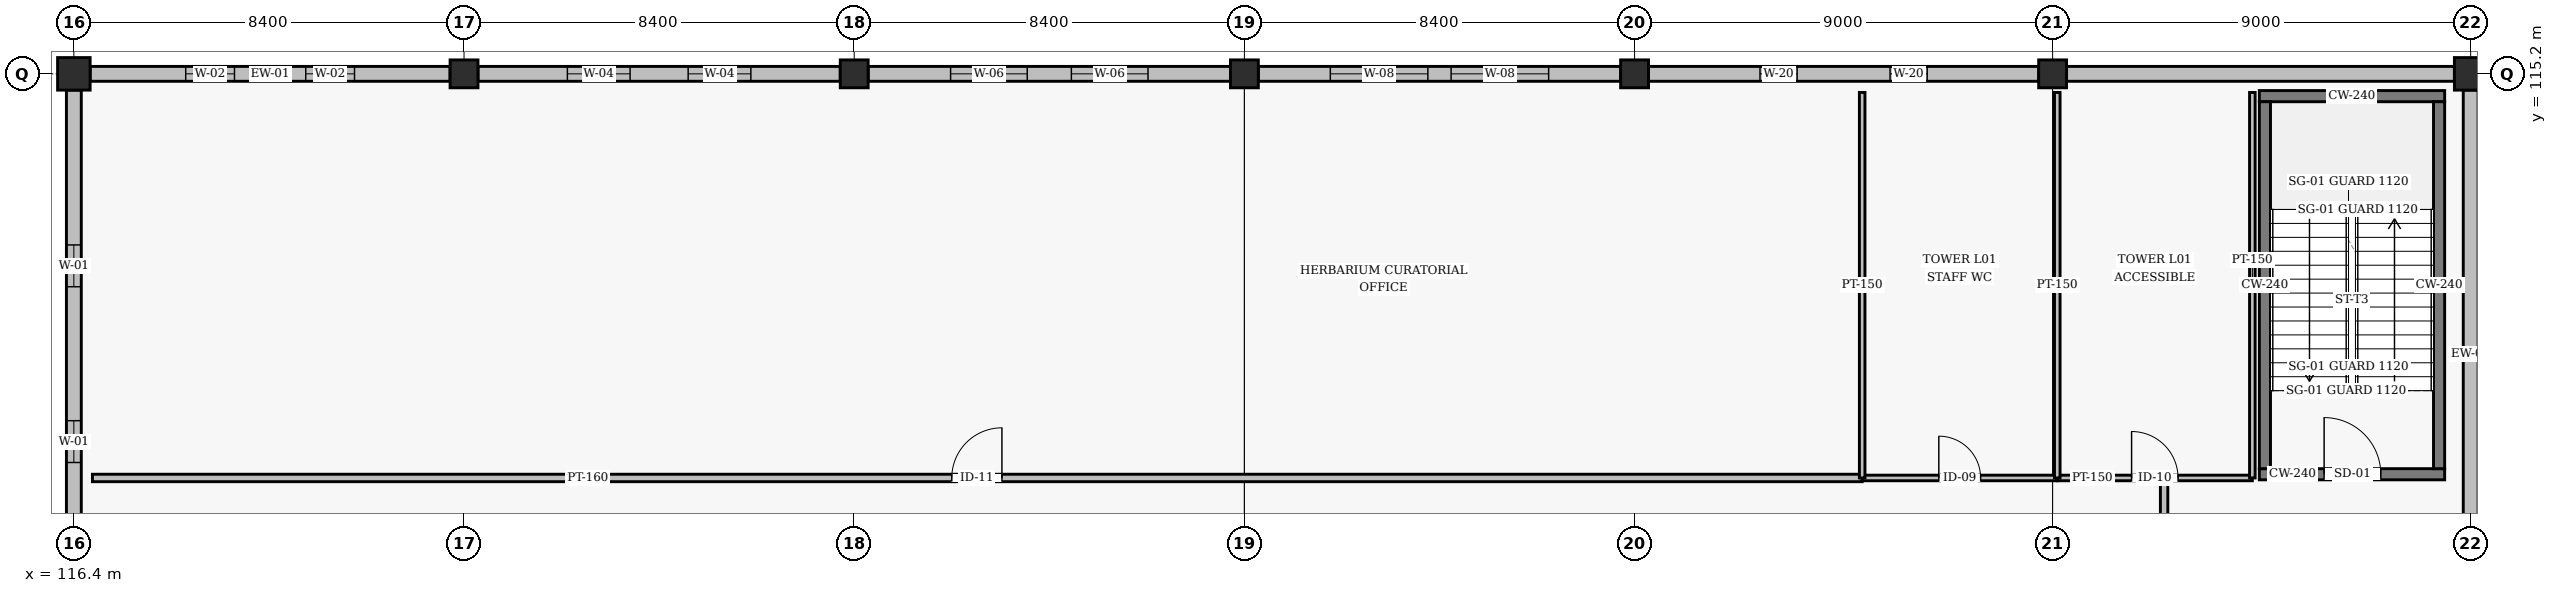
"""IFC4 building model, lengths in metres.
Left out: names, types, materials, properties, quantities, classifications, styles, units other than length and angle.
Written with IfcOpenShell. Run it as: python <this file> out.ifc"""

import sys

from ifc_helpers import new_model, si_unit, direction, frame, frame_2d, origin, origin_2d, place, context, subcontext, project, spatial, rectangle, hollow_rectangle, extrude, element, fill, save


model = new_model("IFC4")
c1 = context("Model", 3, precision=1e-05, world=origin(), true_north=direction((0.0, 1.0)))
c2 = subcontext(c1, "Body", "Model", "MODEL_VIEW")
j1 = project(units=[si_unit("LENGTHUNIT", "METRE"), si_unit("PLANEANGLEUNIT", "RADIAN")], contexts=[c1])
p1 = place(None, origin())
s1 = spatial("IfcSite", under=j1, at=p1, CompositionType="ELEMENT")
p2 = place(p1, origin())
s2 = spatial("IfcBuilding", under=s1, at=p2, CompositionType="ELEMENT")
p3 = place(p2, frame((0.0, 0.0, 4.8)))
s3 = spatial("IfcBuildingStorey", under=s2, at=p3, CompositionType="ELEMENT", Elevation=4.8)
p4 = place(p3, frame((116.4, 115.2, 0.0), z_axis=(0.0, 0.0, 1.0), x_axis=(1.0, 0.0, 0.0)))
e1 = element("IfcColumn", 1, at=p4, inside=s3, PredefinedType="COLUMN", context=c2, shape_type="SweptSolid", body=[
    extrude(hollow_rectangle(XDim=0.7, YDim=0.7, WallThickness=0.032, InnerFilletRadius=0.032, OuterFilletRadius=0.064, at=origin_2d()), origin(), (0.0, 0.0, 1.0), 4.2),
])
for number, where, z_axis, x_axis in (
    (2, (124.8, 115.2, 0.0), (0.0, 0.0, 1.0), (1.0, 0.0, 0.0)),
    (3, (133.2, 115.2, 0.0), (0.0, 0.0, 1.0), (1.0, 0.0, 0.0)),
    (4, (141.6, 115.2, 0.0), (0.0, 0.0, 1.0), (1.0, 0.0, 0.0)),
    (5, (150.0, 115.2, 0.0), (0.0, 0.0, 1.0), (1.0, 0.0, 0.0)),
    (6, (159.0, 115.2, 0.0), (0.0, 0.0, 1.0), (1.0, 0.0, 0.0)),
):
    element("IfcColumn", number, at=place(p3, frame(where, z_axis=z_axis, x_axis=x_axis)), inside=s3, PredefinedType="COLUMN", context=c2, shape_type="SweptSolid", body=[
        extrude(hollow_rectangle(XDim=0.6, YDim=0.6, WallThickness=0.025, InnerFilletRadius=0.025, OuterFilletRadius=0.05, at=origin_2d()), origin(), (0.0, 0.0, 1.0), 4.2),
    ])
p5 = place(p3, frame((168.0, 115.2, 0.0), z_axis=(0.0, 0.0, 1.0), x_axis=(1.0, 0.0, 0.0)))
e7 = element("IfcColumn", 7, at=p5, inside=s3, PredefinedType="COLUMN", context=c2, shape_type="SweptSolid", body=[
    extrude(hollow_rectangle(XDim=0.7, YDim=0.7, WallThickness=0.032, InnerFilletRadius=0.032, OuterFilletRadius=0.064, at=origin_2d()), origin(), (0.0, 0.0, 1.0), 4.2),
])
p6 = place(p3, frame((168.0, 103.5, 0.0), z_axis=(0.0, 0.0, 1.0), x_axis=(0.0, 1.0, 0.0)))
e8 = element("IfcWall", 8, at=p6, inside=s3, PredefinedType="SOLIDWALL", context=c2, shape_type="SweptSolid", body=[
    extrude(rectangle(XDim=11.35, YDim=0.32, at=frame_2d((5.675, 0.0))), origin(), (0.0, 0.0, 1.0), 3.163),
])
p7 = place(p3, frame((167.65, 115.2, 0.0), z_axis=(0.0, 0.0, 1.0), x_axis=(-1.0, 0.0, 0.0)))
e9 = element("IfcWall", 9, at=p7, inside=s3, PredefinedType="SOLIDWALL", context=c2, shape_type="SweptSolid", body=[
    extrude(rectangle(XDim=8.35, YDim=0.32, at=frame_2d((4.175, 0.0))), origin(), (0.0, 0.0, 1.0), 3.163),
])
p8 = place(p3, frame((158.7, 115.2, 0.0), z_axis=(0.0, 0.0, 1.0), x_axis=(-1.0, 0.0, 0.0)))
e10 = element("IfcWall", 10, at=p8, inside=s3, PredefinedType="SOLIDWALL", context=c2, shape_type="SweptSolid", body=[
    extrude(rectangle(XDim=8.4, YDim=0.32, at=frame_2d((4.2, 0.0))), origin(), (0.0, 0.0, 1.0), 3.163),
])
p9 = place(p8, frame((2.4, 0.0, 1.25)))
e11 = element("IfcOpeningElement", 11, at=p9, cuts=e10, PredefinedType="OPENING", context=c2, shape_type="SweptSolid", body=[
    extrude(rectangle(XDim=0.8, YDim=1.35, at=frame_2d((0.4, 0.675))), frame((0.0, 0.17, 0.0), z_axis=(0.0, -1.0, 0.0), x_axis=(1.0, 0.0, 0.0)), (0.0, 0.0, 1.0), 0.34),
])
p10 = place(p8, frame((5.2, 0.0, 1.25)))
e12 = element("IfcOpeningElement", 12, at=p10, cuts=e10, PredefinedType="OPENING", context=c2, shape_type="SweptSolid", body=[
    extrude(rectangle(XDim=0.8, YDim=1.35, at=frame_2d((0.4, 0.675))), frame((0.0, 0.17, 0.0), z_axis=(0.0, -1.0, 0.0), x_axis=(1.0, 0.0, 0.0)), (0.0, 0.0, 1.0), 0.34),
])
p11 = place(p3, frame((149.7, 115.2, 0.0), z_axis=(0.0, 0.0, 1.0), x_axis=(-1.0, 0.0, 0.0)))
e13 = element("IfcWall", 13, at=p11, inside=s3, PredefinedType="SOLIDWALL", context=c2, shape_type="SweptSolid", body=[
    extrude(rectangle(XDim=7.8, YDim=0.32, at=frame_2d((3.9, 0.0))), origin(), (0.0, 0.0, 1.0), 3.263),
])
p12 = place(p11, frame((1.55, 0.0, 0.85)))
e14 = element("IfcOpeningElement", 14, at=p12, cuts=e13, PredefinedType="OPENING", context=c2, shape_type="SweptSolid", body=[
    extrude(rectangle(XDim=2.1, YDim=2.1, at=frame_2d((1.05, 1.05))), frame((0.0, 0.17, 0.0), z_axis=(0.0, -1.0, 0.0), x_axis=(1.0, 0.0, 0.0)), (0.0, 0.0, 1.0), 0.34),
])
p13 = place(p11, frame((4.15, 0.0, 0.85)))
e15 = element("IfcOpeningElement", 15, at=p13, cuts=e13, PredefinedType="OPENING", context=c2, shape_type="SweptSolid", body=[
    extrude(rectangle(XDim=2.1, YDim=2.1, at=frame_2d((1.05, 1.05))), frame((0.0, 0.17, 0.0), z_axis=(0.0, -1.0, 0.0), x_axis=(1.0, 0.0, 0.0)), (0.0, 0.0, 1.0), 0.34),
])
p14 = place(p3, frame((141.3, 115.2, 0.0), z_axis=(0.0, 0.0, 1.0), x_axis=(-1.0, 0.0, 0.0)))
e16 = element("IfcWall", 16, at=p14, inside=s3, PredefinedType="SOLIDWALL", context=c2, shape_type="SweptSolid", body=[
    extrude(rectangle(XDim=7.8, YDim=0.32, at=frame_2d((3.9, 0.0))), origin(), (0.0, 0.0, 1.0), 3.263),
])
p15 = place(p14, frame((1.775, 0.0, 0.85)))
e17 = element("IfcOpeningElement", 17, at=p15, cuts=e16, PredefinedType="OPENING", context=c2, shape_type="SweptSolid", body=[
    extrude(rectangle(XDim=1.65, YDim=2.1, at=frame_2d((0.825, 1.05))), frame((0.0, 0.17, 0.0), z_axis=(0.0, -1.0, 0.0), x_axis=(1.0, 0.0, 0.0)), (0.0, 0.0, 1.0), 0.34),
])
p16 = place(p14, frame((4.375, 0.0, 0.85)))
e18 = element("IfcOpeningElement", 18, at=p16, cuts=e16, PredefinedType="OPENING", context=c2, shape_type="SweptSolid", body=[
    extrude(rectangle(XDim=1.65, YDim=2.1, at=frame_2d((0.825, 1.05))), frame((0.0, 0.17, 0.0), z_axis=(0.0, -1.0, 0.0), x_axis=(1.0, 0.0, 0.0)), (0.0, 0.0, 1.0), 0.34),
])
p17 = place(p3, frame((132.9, 115.2, 0.0), z_axis=(0.0, 0.0, 1.0), x_axis=(-1.0, 0.0, 0.0)))
e19 = element("IfcWall", 19, at=p17, inside=s3, PredefinedType="SOLIDWALL", context=c2, shape_type="SweptSolid", body=[
    extrude(rectangle(XDim=7.8, YDim=0.32, at=frame_2d((3.9, 0.0))), origin(), (0.0, 0.0, 1.0), 3.263),
])
p18 = place(p17, frame((1.925, 0.0, 0.85)))
e20 = element("IfcOpeningElement", 20, at=p18, cuts=e19, PredefinedType="OPENING", context=c2, shape_type="SweptSolid", body=[
    extrude(rectangle(XDim=1.35, YDim=2.1, at=frame_2d((0.675, 1.05))), frame((0.0, 0.17, 0.0), z_axis=(0.0, -1.0, 0.0), x_axis=(1.0, 0.0, 0.0)), (0.0, 0.0, 1.0), 0.34),
])
p19 = place(p17, frame((4.525, 0.0, 0.85)))
e21 = element("IfcOpeningElement", 21, at=p19, cuts=e19, PredefinedType="OPENING", context=c2, shape_type="SweptSolid", body=[
    extrude(rectangle(XDim=1.35, YDim=2.1, at=frame_2d((0.675, 1.05))), frame((0.0, 0.17, 0.0), z_axis=(0.0, -1.0, 0.0), x_axis=(1.0, 0.0, 0.0)), (0.0, 0.0, 1.0), 0.34),
])
p20 = place(p3, frame((124.5, 115.2, 0.0), z_axis=(0.0, 0.0, 1.0), x_axis=(-1.0, 0.0, 0.0)))
e22 = element("IfcWall", 22, at=p20, inside=s3, PredefinedType="SOLIDWALL", context=c2, shape_type="SweptSolid", body=[
    extrude(rectangle(XDim=7.75, YDim=0.32, at=frame_2d((3.875, 0.0))), origin(), (0.0, 0.0, 1.0), 3.263),
])
p21 = place(p20, frame((2.058, 0.0, 0.9)))
e23 = element("IfcOpeningElement", 23, at=p21, cuts=e22, PredefinedType="OPENING", context=c2, shape_type="SweptSolid", body=[
    extrude(rectangle(XDim=1.05, YDim=1.95, at=frame_2d((0.525, 0.975))), frame((0.0, 0.17, 0.0), z_axis=(0.0, -1.0, 0.0), x_axis=(1.0, 0.0, 0.0)), (0.0, 0.0, 1.0), 0.34),
])
p22 = place(p20, frame((4.642, 0.0, 0.9)))
e24 = element("IfcOpeningElement", 24, at=p22, cuts=e22, PredefinedType="OPENING", context=c2, shape_type="SweptSolid", body=[
    extrude(rectangle(XDim=1.05, YDim=1.95, at=frame_2d((0.525, 0.975))), frame((0.0, 0.17, 0.0), z_axis=(0.0, -1.0, 0.0), x_axis=(1.0, 0.0, 0.0)), (0.0, 0.0, 1.0), 0.34),
])
p23 = place(p3, frame((116.4, 114.85, 0.0), z_axis=(0.0, 0.0, 1.0), x_axis=(0.0, -1.0, 0.0)))
e25 = element("IfcWall", 25, at=p23, inside=s3, PredefinedType="SOLIDWALL", context=c2, shape_type="SweptSolid", body=[
    extrude(rectangle(XDim=11.35, YDim=0.32, at=frame_2d((5.675, 0.0))), origin(), (0.0, 0.0, 1.0), 3.163),
])
p24 = place(p23, frame((3.333, 0.0, 0.95)))
e26 = element("IfcOpeningElement", 26, at=p24, cuts=e25, PredefinedType="OPENING", context=c2, shape_type="SweptSolid", body=[
    extrude(rectangle(XDim=0.9, YDim=1.8, at=frame_2d((0.45, 0.9))), frame((0.0, 0.17, 0.0), z_axis=(0.0, -1.0, 0.0), x_axis=(1.0, 0.0, 0.0)), (0.0, 0.0, 1.0), 0.34),
])
p25 = place(p23, frame((7.117, 0.0, 0.95)))
e27 = element("IfcOpeningElement", 27, at=p25, cuts=e25, PredefinedType="OPENING", context=c2, shape_type="SweptSolid", body=[
    extrude(rectangle(XDim=0.9, YDim=1.8, at=frame_2d((0.45, 0.9))), frame((0.0, 0.17, 0.0), z_axis=(0.0, -1.0, 0.0), x_axis=(1.0, 0.0, 0.0)), (0.0, 0.0, 1.0), 0.34),
])
p26 = place(p3, frame((163.45, 106.58, 0.0), z_axis=(0.0, 0.0, 1.0), x_axis=(1.0, 0.0, 0.0)))
e28 = element("IfcWall", 28, at=p26, inside=s3, PredefinedType="SHEAR", context=c2, shape_type="SweptSolid", body=[
    extrude(rectangle(XDim=3.99, YDim=0.24, at=frame_2d((1.995, 0.0))), origin(), (0.0, 0.0, 1.0), 3.955),
])
p27 = place(p26, frame((1.395, 0.0, 0.0)))
e29 = element("IfcOpeningElement", 29, at=p27, cuts=e28, PredefinedType="OPENING", context=c2, shape_type="SweptSolid", body=[
    extrude(rectangle(XDim=1.22, YDim=2.18, at=frame_2d((0.61, 1.09))), frame((0.0, 0.13, 0.0), z_axis=(0.0, -1.0, 0.0), x_axis=(1.0, 0.0, 0.0)), (0.0, 0.0, 1.0), 0.26),
])
p28 = place(p3, frame((163.45, 114.72, 0.0), z_axis=(0.0, 0.0, 1.0), x_axis=(1.0, 0.0, 0.0)))
e30 = element("IfcWall", 30, at=p28, inside=s3, PredefinedType="SHEAR", context=c2, shape_type="SweptSolid", body=[
    extrude(rectangle(XDim=3.99, YDim=0.24, at=frame_2d((1.995, 0.0))), origin(), (0.0, 0.0, 1.0), 3.955),
])
for number, where, z_axis, x_axis in (
    (31, (163.57, 106.7, 0.0), (0.0, 0.0, 1.0), (0.0, 1.0, 0.0)),
    (32, (167.32, 106.7, 0.0), (0.0, 0.0, 1.0), (0.0, 1.0, 0.0)),
):
    element("IfcWall", number, at=place(p3, frame(where, z_axis=z_axis, x_axis=x_axis)), inside=s3, PredefinedType="SHEAR", context=c2, shape_type="SweptSolid", body=[
        extrude(rectangle(XDim=7.9, YDim=0.24, at=frame_2d((3.95, 0.0))), origin(), (0.0, 0.0, 1.0), 3.955),
    ])
p29 = place(p3, frame((161.4, 91.3, 0.0), z_axis=(0.0, 0.0, 1.0), x_axis=(0.0, 1.0, 0.0)))
e33 = element("IfcWall", 33, at=p29, inside=s3, PredefinedType="PARTITIONING", context=c2, shape_type="SweptSolid", body=[
    extrude(rectangle(XDim=15.1, YDim=0.16, at=frame_2d((7.55, 0.0))), origin(), (0.0, 0.0, 1.0), 3.305),
])
p30 = place(p29, frame((7.0, 0.0, 0.0)))
e34 = element("IfcOpeningElement", 34, at=p30, cuts=e33, PredefinedType="OPENING", context=c2, shape_type="SweptSolid", body=[
    extrude(rectangle(XDim=1.08, YDim=2.08, at=frame_2d((0.54, 1.04))), frame((0.0, 0.09, 0.0), z_axis=(0.0, -1.0, 0.0), x_axis=(1.0, 0.0, 0.0)), (0.0, 0.0, 1.0), 0.18),
])
p31 = place(p3, frame((116.8, 106.5, 0.0), z_axis=(0.0, 0.0, 1.0), x_axis=(1.0, 0.0, 0.0)))
e35 = element("IfcWall", 35, at=p31, inside=s3, PredefinedType="PARTITIONING", context=c2, shape_type="SweptSolid", body=[
    extrude(rectangle(XDim=38.1, YDim=0.16, at=frame_2d((19.05, 0.0))), origin(), (0.0, 0.0, 1.0), 3.255),
])
p32 = place(p31, frame((18.5, 0.0, 0.0)))
e36 = element("IfcOpeningElement", 36, at=p32, cuts=e35, PredefinedType="OPENING", context=c2, shape_type="SweptSolid", body=[
    extrude(rectangle(XDim=1.08, YDim=2.08, at=frame_2d((0.54, 1.04))), frame((0.0, 0.09, 0.0), z_axis=(0.0, -1.0, 0.0), x_axis=(1.0, 0.0, 0.0)), (0.0, 0.0, 1.0), 0.18),
])
p33 = place(p3, frame((154.9, 106.5, 0.0), z_axis=(0.0, 0.0, 1.0), x_axis=(1.0, 0.0, 0.0)))
e37 = element("IfcWall", 37, at=p33, inside=s3, PredefinedType="PARTITIONING", context=c2, shape_type="SweptSolid", body=[
    extrude(rectangle(XDim=4.2, YDim=0.12, at=frame_2d((2.1, 0.0))), origin(), (0.0, 0.0, 1.0), 3.255),
])
p34 = place(p33, frame((1.65, 0.0, 0.0)))
e38 = element("IfcOpeningElement", 38, at=p34, cuts=e37, PredefinedType="OPENING", context=c2, shape_type="SweptSolid", body=[
    extrude(rectangle(XDim=0.9, YDim=2.1, at=frame_2d((0.45, 1.05))), frame((0.0, 0.07, 0.0), z_axis=(0.0, -1.0, 0.0), x_axis=(1.0, 0.0, 0.0)), (0.0, 0.0, 1.0), 0.14),
])
p35 = place(p3, frame((159.1, 106.5, 0.0), z_axis=(0.0, 0.0, 1.0), x_axis=(1.0, 0.0, 0.0)))
e39 = element("IfcWall", 39, at=p35, inside=s3, PredefinedType="PARTITIONING", context=c2, shape_type="SweptSolid", body=[
    extrude(rectangle(XDim=4.2, YDim=0.12, at=frame_2d((2.1, 0.0))), origin(), (0.0, 0.0, 1.0), 3.955),
])
p36 = place(p35, frame((1.6, 0.0, 0.0)))
e40 = element("IfcOpeningElement", 40, at=p36, cuts=e39, PredefinedType="OPENING", context=c2, shape_type="SweptSolid", body=[
    extrude(rectangle(XDim=1.0, YDim=2.1, at=frame_2d((0.5, 1.05))), frame((0.0, 0.07, 0.0), z_axis=(0.0, -1.0, 0.0), x_axis=(1.0, 0.0, 0.0)), (0.0, 0.0, 1.0), 0.14),
])
p37 = place(p3, frame((154.9, 106.5, 0.0), z_axis=(0.0, 0.0, 1.0), x_axis=(0.0, 1.0, 0.0)))
e41 = element("IfcWall", 41, at=p37, inside=s3, PredefinedType="PARTITIONING", context=c2, shape_type="SweptSolid", body=[
    extrude(rectangle(XDim=8.3, YDim=0.12, at=frame_2d((4.15, 0.0))), origin(), (0.0, 0.0, 1.0), 3.559),
])
p38 = place(p3, frame((159.1, 106.5, 0.0), z_axis=(0.0, 0.0, 1.0), x_axis=(0.0, 1.0, 0.0)))
e42 = element("IfcWall", 42, at=p38, inside=s3, PredefinedType="PARTITIONING", context=c2, shape_type="SweptSolid", body=[
    extrude(rectangle(XDim=8.3, YDim=0.12, at=frame_2d((4.15, 0.0))), origin(), (0.0, 0.0, 1.0), 3.255),
])
p39 = place(p3, frame((163.3, 106.5, 0.0), z_axis=(0.0, 0.0, 1.0), x_axis=(0.0, 1.0, 0.0)))
e43 = element("IfcWall", 43, at=p39, inside=s3, PredefinedType="PARTITIONING", context=c2, shape_type="SweptSolid", body=[
    extrude(rectangle(XDim=8.3, YDim=0.12, at=frame_2d((4.15, 0.0))), origin(), (0.0, 0.0, 1.0), 3.955),
])
p40 = place(p9, origin())
e44 = element("IfcWindow", 44, at=p40, inside=s3, PartitioningType="SINGLE_PANEL", PredefinedType="WINDOW", context=c2, shape_type="SweptSolid", body=[
    extrude(rectangle(XDim=0.8, YDim=1.35, at=frame_2d((0.4, 0.675))), frame((0.0, 0.03, 0.0), z_axis=(0.0, -1.0, 0.0), x_axis=(1.0, 0.0, 0.0)), (0.0, 0.0, 1.0), 0.06),
])
fill(e11, e44)
p41 = place(p10, origin())
e45 = element("IfcWindow", 45, at=p41, inside=s3, PartitioningType="SINGLE_PANEL", PredefinedType="WINDOW", context=c2, shape_type="SweptSolid", body=[
    extrude(rectangle(XDim=0.8, YDim=1.35, at=frame_2d((0.4, 0.675))), frame((0.0, 0.03, 0.0), z_axis=(0.0, -1.0, 0.0), x_axis=(1.0, 0.0, 0.0)), (0.0, 0.0, 1.0), 0.06),
])
fill(e12, e45)
p42 = place(p12, origin())
e46 = element("IfcWindow", 46, at=p42, inside=s3, PartitioningType="SINGLE_PANEL", PredefinedType="WINDOW", context=c2, shape_type="SweptSolid", body=[
    extrude(rectangle(XDim=2.1, YDim=2.1, at=frame_2d((1.05, 1.05))), frame((0.0, 0.03, 0.0), z_axis=(0.0, -1.0, 0.0), x_axis=(1.0, 0.0, 0.0)), (0.0, 0.0, 1.0), 0.06),
])
fill(e14, e46)
p43 = place(p13, origin())
e47 = element("IfcWindow", 47, at=p43, inside=s3, PartitioningType="SINGLE_PANEL", PredefinedType="WINDOW", context=c2, shape_type="SweptSolid", body=[
    extrude(rectangle(XDim=2.1, YDim=2.1, at=frame_2d((1.05, 1.05))), frame((0.0, 0.03, 0.0), z_axis=(0.0, -1.0, 0.0), x_axis=(1.0, 0.0, 0.0)), (0.0, 0.0, 1.0), 0.06),
])
fill(e15, e47)
p44 = place(p15, origin())
e48 = element("IfcWindow", 48, at=p44, inside=s3, PartitioningType="SINGLE_PANEL", PredefinedType="WINDOW", context=c2, shape_type="SweptSolid", body=[
    extrude(rectangle(XDim=1.65, YDim=2.1, at=frame_2d((0.825, 1.05))), frame((0.0, 0.03, 0.0), z_axis=(0.0, -1.0, 0.0), x_axis=(1.0, 0.0, 0.0)), (0.0, 0.0, 1.0), 0.06),
])
fill(e17, e48)
p45 = place(p16, origin())
e49 = element("IfcWindow", 49, at=p45, inside=s3, PartitioningType="SINGLE_PANEL", PredefinedType="WINDOW", context=c2, shape_type="SweptSolid", body=[
    extrude(rectangle(XDim=1.65, YDim=2.1, at=frame_2d((0.825, 1.05))), frame((0.0, 0.03, 0.0), z_axis=(0.0, -1.0, 0.0), x_axis=(1.0, 0.0, 0.0)), (0.0, 0.0, 1.0), 0.06),
])
fill(e18, e49)
p46 = place(p18, origin())
e50 = element("IfcWindow", 50, at=p46, inside=s3, PartitioningType="SINGLE_PANEL", PredefinedType="WINDOW", context=c2, shape_type="SweptSolid", body=[
    extrude(rectangle(XDim=1.35, YDim=2.1, at=frame_2d((0.675, 1.05))), frame((0.0, 0.03, 0.0), z_axis=(0.0, -1.0, 0.0), x_axis=(1.0, 0.0, 0.0)), (0.0, 0.0, 1.0), 0.06),
])
fill(e20, e50)
p47 = place(p19, origin())
e51 = element("IfcWindow", 51, at=p47, inside=s3, PartitioningType="SINGLE_PANEL", PredefinedType="WINDOW", context=c2, shape_type="SweptSolid", body=[
    extrude(rectangle(XDim=1.35, YDim=2.1, at=frame_2d((0.675, 1.05))), frame((0.0, 0.03, 0.0), z_axis=(0.0, -1.0, 0.0), x_axis=(1.0, 0.0, 0.0)), (0.0, 0.0, 1.0), 0.06),
])
fill(e21, e51)
p48 = place(p21, origin())
e52 = element("IfcWindow", 52, at=p48, inside=s3, PartitioningType="SINGLE_PANEL", PredefinedType="WINDOW", context=c2, shape_type="SweptSolid", body=[
    extrude(rectangle(XDim=1.05, YDim=1.95, at=frame_2d((0.525, 0.975))), frame((0.0, 0.03, 0.0), z_axis=(0.0, -1.0, 0.0), x_axis=(1.0, 0.0, 0.0)), (0.0, 0.0, 1.0), 0.06),
])
fill(e23, e52)
p49 = place(p22, origin())
e53 = element("IfcWindow", 53, at=p49, inside=s3, PartitioningType="SINGLE_PANEL", PredefinedType="WINDOW", context=c2, shape_type="SweptSolid", body=[
    extrude(rectangle(XDim=1.05, YDim=1.95, at=frame_2d((0.525, 0.975))), frame((0.0, 0.03, 0.0), z_axis=(0.0, -1.0, 0.0), x_axis=(1.0, 0.0, 0.0)), (0.0, 0.0, 1.0), 0.06),
])
fill(e24, e53)
p50 = place(p24, origin())
e54 = element("IfcWindow", 54, at=p50, inside=s3, PartitioningType="SINGLE_PANEL", PredefinedType="WINDOW", context=c2, shape_type="SweptSolid", body=[
    extrude(rectangle(XDim=0.9, YDim=1.8, at=frame_2d((0.45, 0.9))), frame((0.0, 0.03, 0.0), z_axis=(0.0, -1.0, 0.0), x_axis=(1.0, 0.0, 0.0)), (0.0, 0.0, 1.0), 0.06),
])
fill(e26, e54)
p51 = place(p25, origin())
e55 = element("IfcWindow", 55, at=p51, inside=s3, PartitioningType="SINGLE_PANEL", PredefinedType="WINDOW", context=c2, shape_type="SweptSolid", body=[
    extrude(rectangle(XDim=0.9, YDim=1.8, at=frame_2d((0.45, 0.9))), frame((0.0, 0.03, 0.0), z_axis=(0.0, -1.0, 0.0), x_axis=(1.0, 0.0, 0.0)), (0.0, 0.0, 1.0), 0.06),
])
fill(e27, e55)
p52 = place(p27, origin())
e56 = element("IfcDoor", 56, at=p52, inside=s3, OperationType="SINGLE_SWING_LEFT", PredefinedType="DOOR", context=c2, shape_type="SweptSolid", body=[
    extrude(rectangle(XDim=1.22, YDim=2.18, at=frame_2d((0.61, 1.09))), frame((0.0, 0.025, 0.0), z_axis=(0.0, -1.0, 0.0), x_axis=(1.0, 0.0, 0.0)), (0.0, 0.0, 1.0), 0.05),
])
fill(e29, e56)
p53 = place(p32, origin())
e57 = element("IfcDoor", 57, at=p53, inside=s3, OperationType="SINGLE_SWING_RIGHT", PredefinedType="DOOR", context=c2, shape_type="SweptSolid", body=[
    extrude(rectangle(XDim=1.08, YDim=2.08, at=frame_2d((0.54, 1.04))), frame((0.0, 0.025, 0.0), z_axis=(0.0, -1.0, 0.0), x_axis=(1.0, 0.0, 0.0)), (0.0, 0.0, 1.0), 0.05),
])
fill(e36, e57)
p54 = place(p34, origin())
e58 = element("IfcDoor", 58, at=p54, inside=s3, OperationType="SINGLE_SWING_LEFT", PredefinedType="DOOR", context=c2, shape_type="SweptSolid", body=[
    extrude(rectangle(XDim=0.9, YDim=2.1, at=frame_2d((0.45, 1.05))), frame((0.0, 0.025, 0.0), z_axis=(0.0, -1.0, 0.0), x_axis=(1.0, 0.0, 0.0)), (0.0, 0.0, 1.0), 0.05),
])
fill(e38, e58)
p55 = place(p36, origin())
e59 = element("IfcDoor", 59, at=p55, inside=s3, OperationType="SINGLE_SWING_LEFT", PredefinedType="DOOR", context=c2, shape_type="SweptSolid", body=[
    extrude(rectangle(XDim=1.0, YDim=2.1, at=frame_2d((0.5, 1.05))), frame((0.0, 0.025, 0.0), z_axis=(0.0, -1.0, 0.0), x_axis=(1.0, 0.0, 0.0)), (0.0, 0.0, 1.0), 0.05),
])
fill(e40, e59)
save(model, sys.argv[1])
